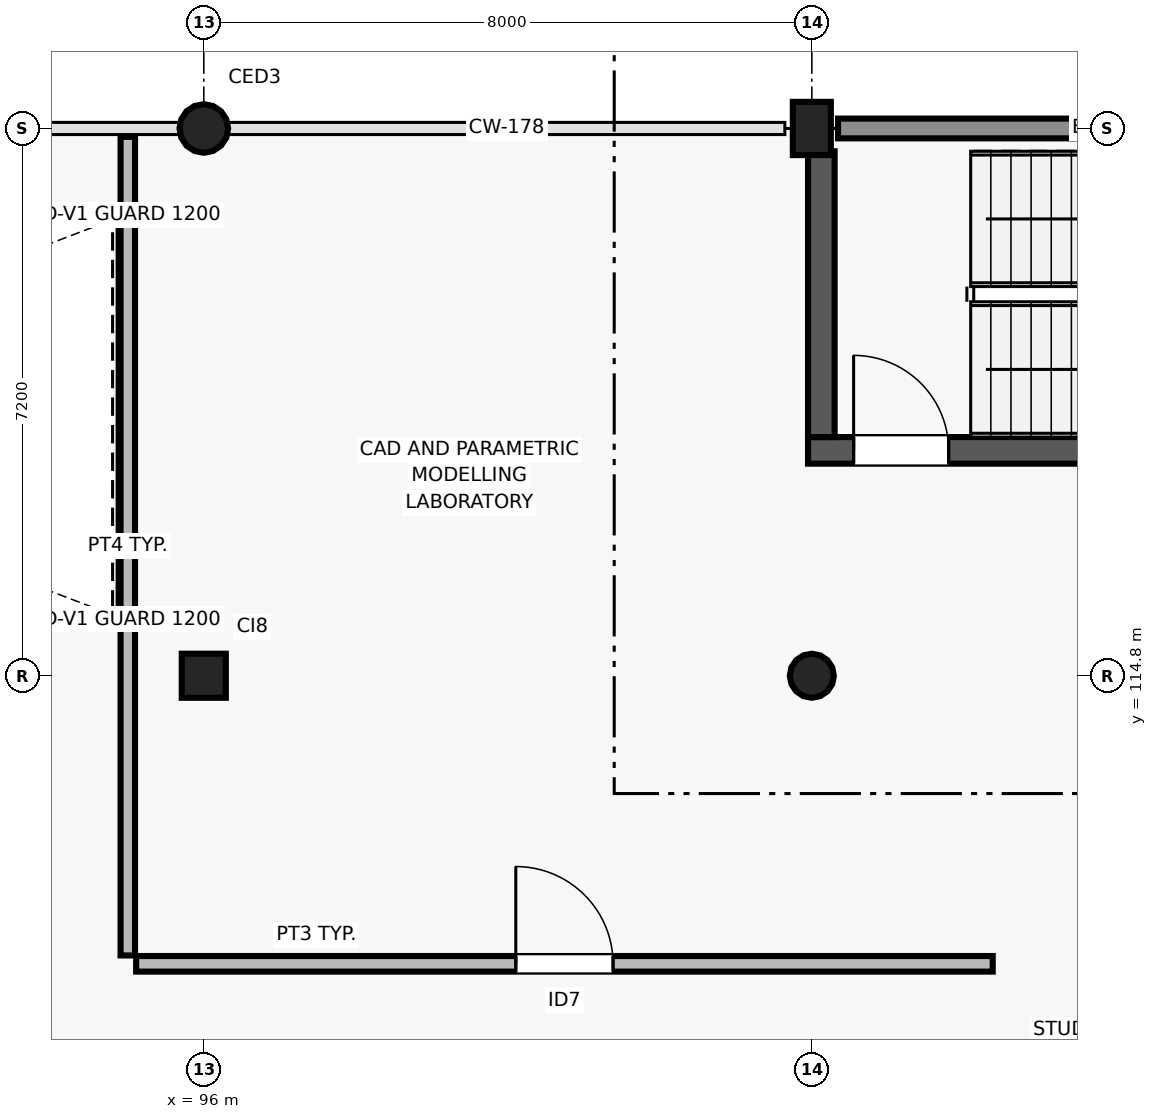
"""IFC4 building model, lengths in metres.
Left out: names, types, materials, properties, quantities, classifications, styles, units other than length and angle.
Written with IfcOpenShell. Run it as: python <this file> out.ifc"""

import sys

from ifc_helpers import new_model, si_unit, direction, frame, frame_2d, origin, origin_2d, place, context, subcontext, project, spatial, rectangle, circle, extrude, element, fill, save


model = new_model("IFC4")
c1 = context("Model", 3, precision=1e-05, world=origin(), true_north=direction((0.0, 1.0)))
c2 = subcontext(c1, "Body", "Model", "MODEL_VIEW")
j1 = project(units=[si_unit("LENGTHUNIT", "METRE"), si_unit("PLANEANGLEUNIT", "RADIAN")], contexts=[c1])
p1 = place(None, origin())
s1 = spatial("IfcSite", under=j1, at=p1, CompositionType="ELEMENT")
p2 = place(p1, origin())
s2 = spatial("IfcBuilding", under=s1, at=p2, CompositionType="ELEMENT")
p3 = place(p2, frame((0.0, 0.0, 17.4)))
s3 = spatial("IfcBuildingStorey", under=s2, at=p3, CompositionType="ELEMENT", Elevation=17.4)
p4 = place(p3, frame((96.0, 114.8, 0.0), z_axis=(0.0, 0.0, 1.0), x_axis=(1.0, 0.0, 0.0)))
e1 = element("IfcColumn", 1, at=p4, inside=s3, PredefinedType="COLUMN", context=c2, shape_type="SweptSolid", body=[
    extrude(rectangle(XDim=0.58, YDim=0.58, at=origin_2d()), origin(), (0.0, 0.0, 1.0), 4.2),
])
p5 = place(p3, frame((96.0, 122.0, 0.0), z_axis=(0.0, 0.0, 1.0), x_axis=(1.0, 0.0, 0.0)))
e2 = element("IfcColumn", 2, at=p5, inside=s3, PredefinedType="COLUMN", context=c2, shape_type="SweptSolid", body=[
    extrude(circle(Radius=0.32, at=origin_2d()), origin(), (0.0, 0.0, 1.0), 4.2),
])
p6 = place(p3, frame((104.0, 114.8, 0.0), z_axis=(0.0, 0.0, 1.0), x_axis=(1.0, 0.0, 0.0)))
e3 = element("IfcColumn", 3, at=p6, inside=s3, PredefinedType="COLUMN", context=c2, shape_type="SweptSolid", body=[
    extrude(circle(Radius=0.29, at=origin_2d()), origin(), (0.0, 0.0, 1.0), 4.2),
])
p7 = place(p3, frame((104.0, 122.0, 0.0), z_axis=(0.0, 0.0, 1.0), x_axis=(1.0, 0.0, 0.0)))
e4 = element("IfcColumn", 4, at=p7, inside=s3, PredefinedType="COLUMN", context=c2, shape_type="SweptSolid", body=[
    extrude(rectangle(XDim=0.7, YDim=0.5, at=origin_2d()), origin(), (0.0, 0.0, 1.0), 4.2),
])
p8 = place(p3, frame((111.665, 122.0, 0.0), z_axis=(0.0, 0.0, 1.0), x_axis=(-1.0, 0.0, 0.0)))
e5 = element("IfcWall", 5, at=p8, inside=s3, PredefinedType="SOLIDWALL", context=c2, shape_type="SweptSolid", body=[
    extrude(rectangle(XDim=7.32, YDim=0.26, at=frame_2d((3.66, 0.0))), origin(), (0.0, 0.0, 1.0), 3.92),
])
p9 = place(p3, frame((103.95, 117.765, 0.0), z_axis=(0.0, 0.0, 1.0), x_axis=(1.0, 0.0, 0.0)))
e6 = element("IfcWall", 6, at=p9, inside=s3, PredefinedType="SHEAR", context=c2, shape_type="SweptSolid", body=[
    extrude(rectangle(XDim=8.1, YDim=0.35, at=frame_2d((4.05, 0.0))), origin(), (0.0, 0.0, 1.0), 3.92),
])
p10 = place(p9, frame((0.6, 0.0, 0.0)))
e7 = element("IfcOpeningElement", 7, at=p10, cuts=e6, PredefinedType="OPENING", context=c2, shape_type="SweptSolid", body=[
    extrude(rectangle(XDim=1.25, YDim=2.2, at=frame_2d((0.625, 1.1))), frame((0.0, 0.185, 0.0), z_axis=(0.0, -1.0, 0.0), x_axis=(1.0, 0.0, 0.0)), (0.0, 0.0, 1.0), 0.37),
])
p11 = place(p3, frame((104.125, 117.94, 0.0), z_axis=(0.0, 0.0, 1.0), x_axis=(0.0, 1.0, 0.0)))
e8 = element("IfcWall", 8, at=p11, inside=s3, PredefinedType="SHEAR", context=c2, shape_type="SweptSolid", body=[
    extrude(rectangle(XDim=3.76, YDim=0.35, at=frame_2d((1.88, 0.0))), origin(), (0.0, 0.0, 1.0), 3.92),
])
p12 = place(p3, frame((95.11, 111.01, 0.0), z_axis=(0.0, 0.0, 1.0), x_axis=(1.0, 0.0, 0.0)))
e9 = element("IfcWall", 9, at=p12, inside=s3, PredefinedType="PARTITIONING", context=c2, shape_type="SweptSolid", body=[
    extrude(rectangle(XDim=11.27, YDim=0.205, at=frame_2d((5.635, 0.0))), origin(), (0.0, 0.0, 1.0), 3.9),
])
p13 = place(p12, frame((4.995, 0.0, 0.0)))
e10 = element("IfcOpeningElement", 10, at=p13, cuts=e9, PredefinedType="OPENING", context=c2, shape_type="SweptSolid", body=[
    extrude(rectangle(XDim=1.28, YDim=2.2, at=frame_2d((0.64, 1.1))), frame((0.0, 0.113, 0.0), z_axis=(0.0, -1.0, 0.0), x_axis=(1.0, 0.0, 0.0)), (0.0, 0.0, 1.0), 0.225),
])
p14 = place(p3, frame((95.0, 111.12, 0.0), z_axis=(0.0, 0.0, 1.0), x_axis=(0.0, 1.0, 0.0)))
e11 = element("IfcWall", 11, at=p14, inside=s3, PredefinedType="PARTITIONING", context=c2, shape_type="SweptSolid", body=[
    extrude(rectangle(XDim=10.77, YDim=0.19, at=frame_2d((5.385, 0.0))), origin(), (0.0, 0.0, 1.0), 3.9),
])
p15 = place(p10, origin())
e12 = element("IfcDoor", 12, at=p15, inside=s3, OperationType="SINGLE_SWING_LEFT", PredefinedType="DOOR", context=c2, shape_type="SweptSolid", body=[
    extrude(rectangle(XDim=1.25, YDim=2.2, at=frame_2d((0.625, 1.1))), frame((0.0, 0.025, 0.0), z_axis=(0.0, -1.0, 0.0), x_axis=(1.0, 0.0, 0.0)), (0.0, 0.0, 1.0), 0.05),
])
fill(e7, e12)
p16 = place(p13, origin())
e13 = element("IfcDoor", 13, at=p16, inside=s3, OperationType="SINGLE_SWING_LEFT", PredefinedType="DOOR", context=c2, shape_type="SweptSolid", body=[
    extrude(rectangle(XDim=1.28, YDim=2.2, at=frame_2d((0.64, 1.1))), frame((0.0, 0.025, 0.0), z_axis=(0.0, -1.0, 0.0), x_axis=(1.0, 0.0, 0.0)), (0.0, 0.0, 1.0), 0.05),
])
fill(e10, e13)
save(model, sys.argv[1])
